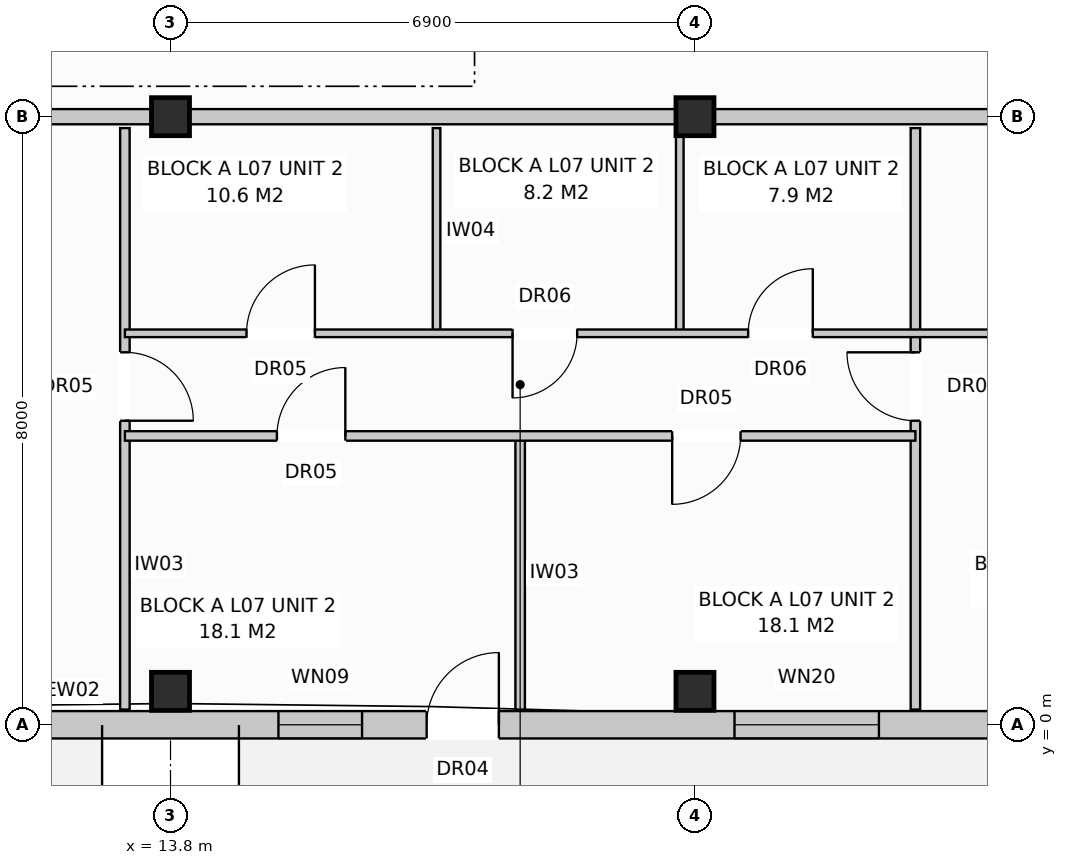
"""IFC4 building model, lengths in metres.
Left out: names, types, materials, properties, quantities, classifications, styles, units other than length and angle.
Written with IfcOpenShell. Run it as: python <this file> out.ifc"""

import sys

from ifc_helpers import new_model, si_unit, direction, frame, frame_2d, origin, origin_with_axes, origin_2d, place, context, subcontext, project, spatial, rectangle, extrude, element, fill, save


model = new_model("IFC4")
c1 = context("Model", 3, precision=1e-05, world=origin(), true_north=direction((0.0, 1.0)))
c2 = subcontext(c1, "Body", "Model", "MODEL_VIEW")
j1 = project(units=[si_unit("LENGTHUNIT", "METRE"), si_unit("PLANEANGLEUNIT", "RADIAN")], contexts=[c1])
p1 = place(None, origin())
s1 = spatial("IfcSite", under=j1, at=p1, CompositionType="ELEMENT")
p2 = place(p1, origin())
s2 = spatial("IfcBuilding", under=s1, at=p2, CompositionType="ELEMENT")
p3 = place(p2, frame((0.0, 0.0, 24.0)))
s3 = spatial("IfcBuildingStorey", under=s2, at=p3, CompositionType="ELEMENT", Elevation=24.0)
for number, where, z_axis, x_axis in (
    (1, (13.8, 0.44, 0.0), (0.0, 0.0, 1.0), (1.0, 0.0, 0.0)),
    (2, (13.8, 8.0, 0.0), (0.0, 0.0, 1.0), (1.0, 0.0, 0.0)),
    (3, (20.7, 0.44, 0.0), (0.0, 0.0, 1.0), (1.0, 0.0, 0.0)),
    (4, (20.7, 8.0, 0.0), (0.0, 0.0, 1.0), (1.0, 0.0, 0.0)),
):
    element("IfcColumn", number, at=place(p3, frame(where, z_axis=z_axis, x_axis=x_axis)), inside=s3, PredefinedType="COLUMN", context=c2, shape_type="SweptSolid", body=[
        extrude(rectangle(XDim=0.5, YDim=0.5, at=origin_2d()), origin(), (0.0, 0.0, 1.0), 3.2),
    ])
p4 = place(p3, frame((0.17, 0.0, 0.0), z_axis=(0.0, 0.0, 1.0), x_axis=(1.0, 0.0, 0.0)))
e5 = element("IfcWall", 5, at=p4, inside=s3, PredefinedType="STANDARD", context=c2, shape_type="SweptSolid", body=[
    extrude(rectangle(XDim=54.86, YDim=0.36, at=frame_2d((27.43, 0.0))), origin(), (0.0, 0.0, 1.0), 2.95),
])
p5 = place(p4, frame((2.5, 0.0, 0.0)))
e6 = element("IfcOpeningElement", 6, at=p5, cuts=e5, PredefinedType="OPENING", context=c2, shape_type="SweptSolid", body=[
    extrude(rectangle(XDim=0.95, YDim=2.1, at=frame_2d((0.475, 1.05))), frame((0.0, 0.192, 0.0), z_axis=(0.0, -1.0, 0.0), x_axis=(1.0, 0.0, 0.0)), (0.0, 0.0, 1.0), 0.384),
])
p6 = place(p4, frame((17.0, 0.0, 0.0)))
e7 = element("IfcOpeningElement", 7, at=p6, cuts=e5, PredefinedType="OPENING", context=c2, shape_type="SweptSolid", body=[
    extrude(rectangle(XDim=0.95, YDim=2.1, at=frame_2d((0.475, 1.05))), frame((0.0, 0.192, 0.0), z_axis=(0.0, -1.0, 0.0), x_axis=(1.0, 0.0, 0.0)), (0.0, 0.0, 1.0), 0.384),
])
p7 = place(p4, frame((30.1, 0.0, 0.0)))
e8 = element("IfcOpeningElement", 8, at=p7, cuts=e5, PredefinedType="OPENING", context=c2, shape_type="SweptSolid", body=[
    extrude(rectangle(XDim=0.95, YDim=2.1, at=frame_2d((0.475, 1.05))), frame((0.0, 0.192, 0.0), z_axis=(0.0, -1.0, 0.0), x_axis=(1.0, 0.0, 0.0)), (0.0, 0.0, 1.0), 0.384),
])
p8 = place(p4, frame((46.5, 0.0, 0.0)))
e9 = element("IfcOpeningElement", 9, at=p8, cuts=e5, PredefinedType="OPENING", context=c2, shape_type="SweptSolid", body=[
    extrude(rectangle(XDim=0.95, YDim=2.1, at=frame_2d((0.475, 1.05))), frame((0.0, 0.192, 0.0), z_axis=(0.0, -1.0, 0.0), x_axis=(1.0, 0.0, 0.0)), (0.0, 0.0, 1.0), 0.384),
])
p9 = place(p4, frame((0.75, 0.0, 0.72)))
e10 = element("IfcOpeningElement", 10, at=p9, cuts=e5, PredefinedType="OPENING", context=c2, shape_type="SweptSolid", body=[
    extrude(rectangle(XDim=1.1, YDim=1.5, at=frame_2d((0.55, 0.75))), frame((0.0, 0.192, 0.0), z_axis=(0.0, -1.0, 0.0), x_axis=(1.0, 0.0, 0.0)), (0.0, 0.0, 1.0), 0.384),
])
p10 = place(p4, frame((4.25, 0.0, 0.72)))
e11 = element("IfcOpeningElement", 11, at=p10, cuts=e5, PredefinedType="OPENING", context=c2, shape_type="SweptSolid", body=[
    extrude(rectangle(XDim=1.9, YDim=1.85, at=frame_2d((0.95, 0.925))), frame((0.0, 0.192, 0.0), z_axis=(0.0, -1.0, 0.0), x_axis=(1.0, 0.0, 0.0)), (0.0, 0.0, 1.0), 0.384),
])
p11 = place(p4, frame((8.925, 0.0, 0.8)))
e12 = element("IfcOpeningElement", 12, at=p11, cuts=e5, PredefinedType="OPENING", context=c2, shape_type="SweptSolid", body=[
    extrude(rectangle(XDim=1.95, YDim=1.65, at=frame_2d((0.975, 0.825))), frame((0.0, 0.192, 0.0), z_axis=(0.0, -1.0, 0.0), x_axis=(1.0, 0.0, 0.0)), (0.0, 0.0, 1.0), 0.384),
])
p12 = place(p4, frame((15.05, 0.0, 0.72)))
e13 = element("IfcOpeningElement", 13, at=p12, cuts=e5, PredefinedType="OPENING", context=c2, shape_type="SweptSolid", body=[
    extrude(rectangle(XDim=1.1, YDim=1.5, at=frame_2d((0.55, 0.75))), frame((0.0, 0.192, 0.0), z_axis=(0.0, -1.0, 0.0), x_axis=(1.0, 0.0, 0.0)), (0.0, 0.0, 1.0), 0.384),
])
p13 = place(p4, frame((21.05, 0.0, 0.72)))
e14 = element("IfcOpeningElement", 14, at=p13, cuts=e5, PredefinedType="OPENING", context=c2, shape_type="SweptSolid", body=[
    extrude(rectangle(XDim=1.9, YDim=1.85, at=frame_2d((0.95, 0.925))), frame((0.0, 0.192, 0.0), z_axis=(0.0, -1.0, 0.0), x_axis=(1.0, 0.0, 0.0)), (0.0, 0.0, 1.0), 0.384),
])
p14 = place(p4, frame((24.85, 0.0, 0.72)))
e15 = element("IfcOpeningElement", 15, at=p14, cuts=e5, PredefinedType="OPENING", context=c2, shape_type="SweptSolid", body=[
    extrude(rectangle(XDim=1.1, YDim=1.5, at=frame_2d((0.55, 0.75))), frame((0.0, 0.192, 0.0), z_axis=(0.0, -1.0, 0.0), x_axis=(1.0, 0.0, 0.0)), (0.0, 0.0, 1.0), 0.384),
])
p15 = place(p4, frame((28.35, 0.0, 0.72)))
e16 = element("IfcOpeningElement", 16, at=p15, cuts=e5, PredefinedType="OPENING", context=c2, shape_type="SweptSolid", body=[
    extrude(rectangle(XDim=1.1, YDim=1.5, at=frame_2d((0.55, 0.75))), frame((0.0, 0.192, 0.0), z_axis=(0.0, -1.0, 0.0), x_axis=(1.0, 0.0, 0.0)), (0.0, 0.0, 1.0), 0.384),
])
p16 = place(p4, frame((31.85, 0.0, 0.72)))
e17 = element("IfcOpeningElement", 17, at=p16, cuts=e5, PredefinedType="OPENING", context=c2, shape_type="SweptSolid", body=[
    extrude(rectangle(XDim=1.9, YDim=1.85, at=frame_2d((0.95, 0.925))), frame((0.0, 0.192, 0.0), z_axis=(0.0, -1.0, 0.0), x_axis=(1.0, 0.0, 0.0)), (0.0, 0.0, 1.0), 0.384),
])
p17 = place(p4, frame((35.525, 0.0, 0.8)))
e18 = element("IfcOpeningElement", 18, at=p17, cuts=e5, PredefinedType="OPENING", context=c2, shape_type="SweptSolid", body=[
    extrude(rectangle(XDim=1.95, YDim=1.65, at=frame_2d((0.975, 0.825))), frame((0.0, 0.192, 0.0), z_axis=(0.0, -1.0, 0.0), x_axis=(1.0, 0.0, 0.0)), (0.0, 0.0, 1.0), 0.384),
])
p18 = place(p4, frame((39.25, 0.0, 0.72)))
e19 = element("IfcOpeningElement", 19, at=p18, cuts=e5, PredefinedType="OPENING", context=c2, shape_type="SweptSolid", body=[
    extrude(rectangle(XDim=1.1, YDim=1.5, at=frame_2d((0.55, 0.75))), frame((0.0, 0.192, 0.0), z_axis=(0.0, -1.0, 0.0), x_axis=(1.0, 0.0, 0.0)), (0.0, 0.0, 1.0), 0.384),
])
p19 = place(p4, frame((42.45, 0.0, 0.8)))
e20 = element("IfcOpeningElement", 20, at=p19, cuts=e5, PredefinedType="OPENING", context=c2, shape_type="SweptSolid", body=[
    extrude(rectangle(XDim=1.9, YDim=1.85, at=frame_2d((0.95, 0.925))), frame((0.0, 0.192, 0.0), z_axis=(0.0, -1.0, 0.0), x_axis=(1.0, 0.0, 0.0)), (0.0, 0.0, 1.0), 0.384),
])
p20 = place(p4, frame((48.7, 0.0, 0.9)))
e21 = element("IfcOpeningElement", 21, at=p20, cuts=e5, PredefinedType="OPENING", context=c2, shape_type="SweptSolid", body=[
    extrude(rectangle(XDim=0.95, YDim=1.55, at=frame_2d((0.475, 0.775))), frame((0.0, 0.192, 0.0), z_axis=(0.0, -1.0, 0.0), x_axis=(1.0, 0.0, 0.0)), (0.0, 0.0, 1.0), 0.384),
])
p21 = place(p4, frame((51.5, 0.0, 0.8)))
e22 = element("IfcOpeningElement", 22, at=p21, cuts=e5, PredefinedType="OPENING", context=c2, shape_type="SweptSolid", body=[
    extrude(rectangle(XDim=1.8, YDim=1.7, at=frame_2d((0.9, 0.85))), frame((0.0, 0.192, 0.0), z_axis=(0.0, -1.0, 0.0), x_axis=(1.0, 0.0, 0.0)), (0.0, 0.0, 1.0), 0.384),
])
p22 = place(p3, frame((6.9, 8.0, 0.0), z_axis=(0.0, 0.0, 1.0), x_axis=(1.0, 0.0, 0.0)))
e23 = element("IfcWall", 23, at=p22, inside=s3, PredefinedType="PARTITIONING", context=c2, shape_type="SweptSolid", body=[
    extrude(rectangle(XDim=20.7, YDim=0.2, at=frame_2d((10.35, 0.0))), origin(), (0.0, 0.0, 1.0), 2.39),
])
p23 = place(p22, frame((2.4, 0.0, 0.0)))
e24 = element("IfcOpeningElement", 24, at=p23, cuts=e23, PredefinedType="OPENING", context=c2, shape_type="SweptSolid", body=[
    extrude(rectangle(XDim=0.95, YDim=2.15, at=frame_2d((0.475, 1.075))), frame((0.0, 0.112, 0.0), z_axis=(0.0, -1.0, 0.0), x_axis=(1.0, 0.0, 0.0)), (0.0, 0.0, 1.0), 0.224),
])
p24 = place(p3, frame((13.2, 7.85, 0.0), z_axis=(0.0, 0.0, 1.0), x_axis=(0.0, -1.0, 0.0)))
e25 = element("IfcWall", 25, at=p24, inside=s3, PredefinedType="PARTITIONING", context=c2, shape_type="SweptSolid", body=[
    extrude(rectangle(XDim=7.65, YDim=0.125, at=frame_2d((3.825, 0.0))), origin(), (0.0, 0.0, 1.0), 2.59),
])
p25 = place(p24, frame((2.95, 0.0, 0.0)))
e26 = element("IfcOpeningElement", 26, at=p25, cuts=e25, PredefinedType="OPENING", context=c2, shape_type="SweptSolid", body=[
    extrude(rectangle(XDim=0.9, YDim=2.1, at=frame_2d((0.45, 1.05))), frame((0.0, 0.074, 0.0), z_axis=(0.0, -1.0, 0.0), x_axis=(1.0, 0.0, 0.0)), (0.0, 0.0, 1.0), 0.149),
])
for number, where, z_axis, x_axis in (
    (27, (17.3, 7.85, 0.0), (0.0, 0.0, 1.0), (0.0, -1.0, 0.0)),
    (28, (20.5, 7.85, 0.0), (0.0, 0.0, 1.0), (0.0, -1.0, 0.0)),
):
    element("IfcWall", number, at=place(p3, frame(where, z_axis=z_axis, x_axis=x_axis)), inside=s3, PredefinedType="PARTITIONING", context=c2, shape_type="SweptSolid", body=[
        extrude(rectangle(XDim=2.7, YDim=0.1, at=frame_2d((1.35, 0.0))), origin(), (0.0, 0.0, 1.0), 2.95),
    ])
p26 = place(p3, frame((18.4, 3.8, 0.0), z_axis=(0.0, 0.0, 1.0), x_axis=(0.0, -1.0, 0.0)))
e29 = element("IfcWall", 29, at=p26, inside=s3, PredefinedType="PARTITIONING", context=c2, shape_type="SweptSolid", body=[
    extrude(rectangle(XDim=3.6, YDim=0.125, at=frame_2d((1.8, 0.0))), origin(), (0.0, 0.0, 1.0), 2.95),
])
p27 = place(p3, frame((23.6, 7.85, 0.0), z_axis=(0.0, 0.0, 1.0), x_axis=(0.0, -1.0, 0.0)))
e30 = element("IfcWall", 30, at=p27, inside=s3, PredefinedType="PARTITIONING", context=c2, shape_type="SweptSolid", body=[
    extrude(rectangle(XDim=7.65, YDim=0.125, at=frame_2d((3.825, 0.0))), origin(), (0.0, 0.0, 1.0), 2.95),
])
p28 = place(p27, frame((2.95, 0.0, 0.0)))
e31 = element("IfcOpeningElement", 31, at=p28, cuts=e30, PredefinedType="OPENING", context=c2, shape_type="SweptSolid", body=[
    extrude(rectangle(XDim=0.9, YDim=2.1, at=frame_2d((0.45, 1.05))), frame((0.0, 0.074, 0.0), z_axis=(0.0, -1.0, 0.0), x_axis=(1.0, 0.0, 0.0)), (0.0, 0.0, 1.0), 0.149),
])
p29 = place(p3, frame((13.2, 5.15, 0.0), z_axis=(0.0, 0.0, 1.0), x_axis=(1.0, 0.0, 0.0)))
e32 = element("IfcWall", 32, at=p29, inside=s3, PredefinedType="PARTITIONING", context=c2, shape_type="SweptSolid", body=[
    extrude(rectangle(XDim=14.3, YDim=0.1, at=frame_2d((7.15, 0.0))), origin(), (0.0, 0.0, 1.0), 2.95),
])
p30 = place(p29, frame((1.6, 0.0, 0.0)))
e33 = element("IfcOpeningElement", 33, at=p30, cuts=e32, PredefinedType="OPENING", context=c2, shape_type="SweptSolid", body=[
    extrude(rectangle(XDim=0.9, YDim=2.1, at=frame_2d((0.45, 1.05))), frame((0.0, 0.062, 0.0), z_axis=(0.0, -1.0, 0.0), x_axis=(1.0, 0.0, 0.0)), (0.0, 0.0, 1.0), 0.124),
])
p31 = place(p29, frame((5.1, 0.0, 0.0)))
e34 = element("IfcOpeningElement", 34, at=p31, cuts=e32, PredefinedType="OPENING", context=c2, shape_type="SweptSolid", body=[
    extrude(rectangle(XDim=0.85, YDim=2.05, at=frame_2d((0.425, 1.025))), frame((0.0, 0.062, 0.0), z_axis=(0.0, -1.0, 0.0), x_axis=(1.0, 0.0, 0.0)), (0.0, 0.0, 1.0), 0.124),
])
p32 = place(p29, frame((8.2, 0.0, 0.0)))
e35 = element("IfcOpeningElement", 35, at=p32, cuts=e32, PredefinedType="OPENING", context=c2, shape_type="SweptSolid", body=[
    extrude(rectangle(XDim=0.85, YDim=2.05, at=frame_2d((0.425, 1.025))), frame((0.0, 0.062, 0.0), z_axis=(0.0, -1.0, 0.0), x_axis=(1.0, 0.0, 0.0)), (0.0, 0.0, 1.0), 0.124),
])
p33 = place(p29, frame((11.6, 0.0, 0.0)))
e36 = element("IfcOpeningElement", 36, at=p33, cuts=e32, PredefinedType="OPENING", context=c2, shape_type="SweptSolid", body=[
    extrude(rectangle(XDim=0.85, YDim=2.05, at=frame_2d((0.425, 1.025))), frame((0.0, 0.062, 0.0), z_axis=(0.0, -1.0, 0.0), x_axis=(1.0, 0.0, 0.0)), (0.0, 0.0, 1.0), 0.124),
])
p34 = place(p3, frame((13.2, 3.8, 0.0), z_axis=(0.0, 0.0, 1.0), x_axis=(1.0, 0.0, 0.0)))
e37 = element("IfcWall", 37, at=p34, inside=s3, PredefinedType="PARTITIONING", context=c2, shape_type="SweptSolid", body=[
    extrude(rectangle(XDim=10.4, YDim=0.125, at=frame_2d((5.2, 0.0))), origin(), (0.0, 0.0, 1.0), 2.95),
])
p35 = place(p34, frame((2.0, 0.0, 0.0)))
e38 = element("IfcOpeningElement", 38, at=p35, cuts=e37, PredefinedType="OPENING", context=c2, shape_type="SweptSolid", body=[
    extrude(rectangle(XDim=0.9, YDim=2.1, at=frame_2d((0.45, 1.05))), frame((0.0, 0.074, 0.0), z_axis=(0.0, -1.0, 0.0), x_axis=(1.0, 0.0, 0.0)), (0.0, 0.0, 1.0), 0.149),
])
p36 = place(p34, frame((7.2, 0.0, 0.0)))
e39 = element("IfcOpeningElement", 39, at=p36, cuts=e37, PredefinedType="OPENING", context=c2, shape_type="SweptSolid", body=[
    extrude(rectangle(XDim=0.9, YDim=2.1, at=frame_2d((0.45, 1.05))), frame((0.0, 0.074, 0.0), z_axis=(0.0, -1.0, 0.0), x_axis=(1.0, 0.0, 0.0)), (0.0, 0.0, 1.0), 0.149),
])
p37 = place(p6, origin_with_axes())
e40 = element("IfcDoor", 40, at=p37, inside=s3, OperationType="SINGLE_SWING_RIGHT", PredefinedType="DOOR", context=c2, shape_type="SweptSolid", body=[
    extrude(rectangle(XDim=0.95, YDim=2.1, at=frame_2d((0.475, 1.05))), frame((0.0, 0.025, 0.0), z_axis=(0.0, -1.0, 0.0), x_axis=(1.0, 0.0, 0.0)), (0.0, 0.0, 1.0), 0.05),
])
fill(e7, e40)
p38 = place(p12, origin_with_axes())
e41 = element("IfcWindow", 41, at=p38, inside=s3, PartitioningType="SINGLE_PANEL", PredefinedType="WINDOW", context=c2, shape_type="SweptSolid", body=[
    extrude(rectangle(XDim=1.1, YDim=1.5, at=frame_2d((0.55, 0.75))), frame((0.0, 0.03, 0.0), z_axis=(0.0, -1.0, 0.0), x_axis=(1.0, 0.0, 0.0)), (0.0, 0.0, 1.0), 0.06),
])
fill(e13, e41)
p39 = place(p13, origin_with_axes())
e42 = element("IfcWindow", 42, at=p39, inside=s3, PartitioningType="SINGLE_PANEL", PredefinedType="WINDOW", context=c2, shape_type="SweptSolid", body=[
    extrude(rectangle(XDim=1.9, YDim=1.85, at=frame_2d((0.95, 0.925))), frame((0.0, 0.03, 0.0), z_axis=(0.0, -1.0, 0.0), x_axis=(1.0, 0.0, 0.0)), (0.0, 0.0, 1.0), 0.06),
])
fill(e14, e42)
p40 = place(p25, origin_with_axes())
e43 = element("IfcDoor", 43, at=p40, inside=s3, OperationType="SINGLE_SWING_RIGHT", PredefinedType="DOOR", context=c2, shape_type="SweptSolid", body=[
    extrude(rectangle(XDim=0.9, YDim=2.1, at=frame_2d((0.45, 1.05))), frame((0.0, 0.025, 0.0), z_axis=(0.0, -1.0, 0.0), x_axis=(1.0, 0.0, 0.0)), (0.0, 0.0, 1.0), 0.05),
])
fill(e26, e43)
p41 = place(p28, frame((0.9, 0.0, 0.0), z_axis=(0.0, 0.0, 1.0), x_axis=(-1.0, 0.0, 0.0)))
e44 = element("IfcDoor", 44, at=p41, inside=s3, OperationType="SINGLE_SWING_LEFT", PredefinedType="DOOR", context=c2, shape_type="SweptSolid", body=[
    extrude(rectangle(XDim=0.9, YDim=2.1, at=frame_2d((0.45, 1.05))), frame((0.0, 0.025, 0.0), z_axis=(0.0, -1.0, 0.0), x_axis=(1.0, 0.0, 0.0)), (0.0, 0.0, 1.0), 0.05),
])
fill(e31, e44)
p42 = place(p30, origin_with_axes())
e45 = element("IfcDoor", 45, at=p42, inside=s3, OperationType="SINGLE_SWING_RIGHT", PredefinedType="DOOR", context=c2, shape_type="SweptSolid", body=[
    extrude(rectangle(XDim=0.9, YDim=2.1, at=frame_2d((0.45, 1.05))), frame((0.0, 0.025, 0.0), z_axis=(0.0, -1.0, 0.0), x_axis=(1.0, 0.0, 0.0)), (0.0, 0.0, 1.0), 0.05),
])
fill(e33, e45)
p43 = place(p31, frame((0.85, 0.0, 0.0), z_axis=(0.0, 0.0, 1.0), x_axis=(-1.0, 0.0, 0.0)))
e46 = element("IfcDoor", 46, at=p43, inside=s3, OperationType="SINGLE_SWING_LEFT", PredefinedType="DOOR", context=c2, shape_type="SweptSolid", body=[
    extrude(rectangle(XDim=0.85, YDim=2.05, at=frame_2d((0.425, 1.025))), frame((0.0, 0.025, 0.0), z_axis=(0.0, -1.0, 0.0), x_axis=(1.0, 0.0, 0.0)), (0.0, 0.0, 1.0), 0.05),
])
fill(e34, e46)
p44 = place(p32, origin_with_axes())
e47 = element("IfcDoor", 47, at=p44, inside=s3, OperationType="SINGLE_SWING_RIGHT", PredefinedType="DOOR", context=c2, shape_type="SweptSolid", body=[
    extrude(rectangle(XDim=0.85, YDim=2.05, at=frame_2d((0.425, 1.025))), frame((0.0, 0.025, 0.0), z_axis=(0.0, -1.0, 0.0), x_axis=(1.0, 0.0, 0.0)), (0.0, 0.0, 1.0), 0.05),
])
fill(e35, e47)
p45 = place(p35, origin_with_axes())
e48 = element("IfcDoor", 48, at=p45, inside=s3, OperationType="SINGLE_SWING_RIGHT", PredefinedType="DOOR", context=c2, shape_type="SweptSolid", body=[
    extrude(rectangle(XDim=0.9, YDim=2.1, at=frame_2d((0.45, 1.05))), frame((0.0, 0.025, 0.0), z_axis=(0.0, -1.0, 0.0), x_axis=(1.0, 0.0, 0.0)), (0.0, 0.0, 1.0), 0.05),
])
fill(e38, e48)
p46 = place(p36, frame((0.9, 0.0, 0.0), z_axis=(0.0, 0.0, 1.0), x_axis=(-1.0, 0.0, 0.0)))
e49 = element("IfcDoor", 49, at=p46, inside=s3, OperationType="SINGLE_SWING_LEFT", PredefinedType="DOOR", context=c2, shape_type="SweptSolid", body=[
    extrude(rectangle(XDim=0.9, YDim=2.1, at=frame_2d((0.45, 1.05))), frame((0.0, 0.025, 0.0), z_axis=(0.0, -1.0, 0.0), x_axis=(1.0, 0.0, 0.0)), (0.0, 0.0, 1.0), 0.05),
])
fill(e39, e49)
save(model, sys.argv[1])
